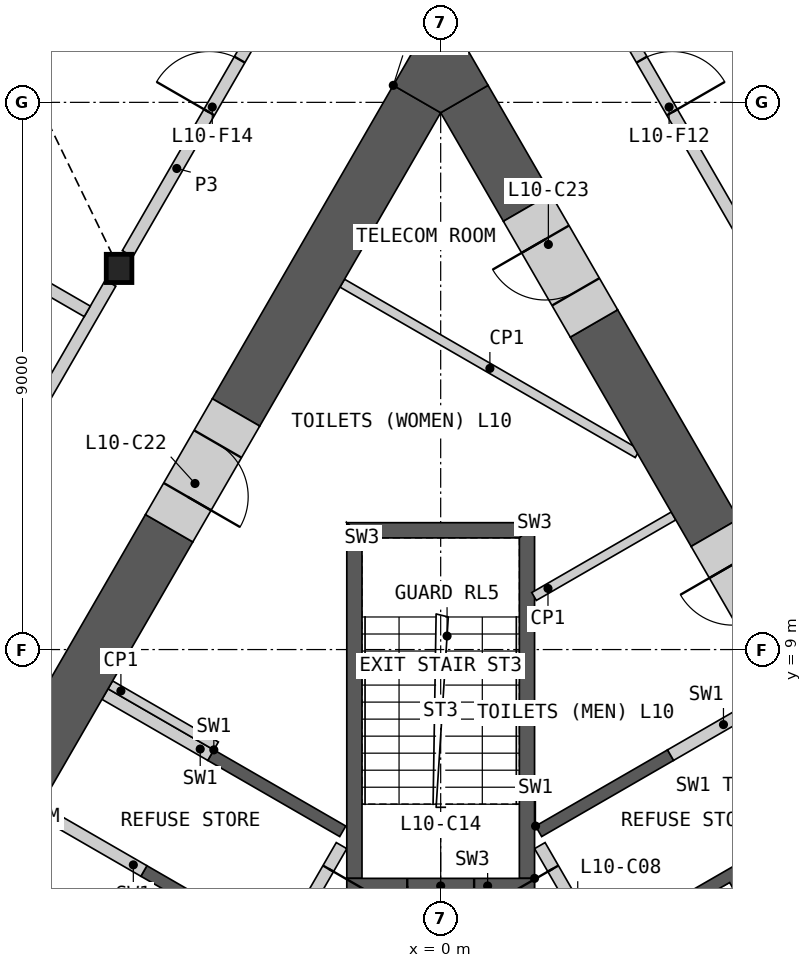
"""IFC4 building model, lengths in metres.
Left out: names, types, materials, properties, quantities, classifications, styles, units other than length and angle.
Written with IfcOpenShell. Run it as: python <this file> out.ifc"""

import sys

from ifc_helpers import new_model, si_unit, direction, frame, frame_2d, origin, origin_2d, place, context, subcontext, project, spatial, polyline, rectangle, i_section, outline, extrude, element, fill, save


model = new_model("IFC4")
c1 = context("Model", 3, precision=1e-05, world=origin(), true_north=direction((0.0, 1.0)))
c2 = subcontext(c1, "Body", "Model", "MODEL_VIEW")
j1 = project(units=[si_unit("LENGTHUNIT", "METRE"), si_unit("PLANEANGLEUNIT", "RADIAN")], contexts=[c1])
p1 = place(None, origin())
s1 = spatial("IfcSite", under=j1, at=p1, CompositionType="ELEMENT")
p2 = place(p1, origin())
s2 = spatial("IfcBuilding", under=s1, at=p2, CompositionType="ELEMENT")
p3 = place(p2, frame((0.0, 0.0, 51.0)))
s3 = spatial("IfcBuildingStorey", under=s2, at=p3, CompositionType="ELEMENT", Elevation=51.0)
p4 = place(p3, frame((-5.289, 15.269, 0.0), z_axis=(0.0, 0.0, 1.0), x_axis=(1.0, 0.0, 0.0)))
e1 = element("IfcColumn", 1, at=p4, inside=s3, PredefinedType="COLUMN", context=c2, shape_type="SweptSolid", body=[
    extrude(i_section(OverallWidth=0.421, OverallDepth=0.465, WebThickness=0.045, FlangeThickness=0.072, at=origin_2d()), origin(), (0.0, 0.0, 1.0), 4.2),
])
p5 = place(p3, origin())
e2 = element("IfcWall", 2, at=p5, inside=s3, PredefinedType="SHEAR", context=c2, shape_type="SweptSolid", body=[
    extrude(outline(polyline([(1.561, 6.097), (3.731, 7.35), (3.831, 7.177), (1.66, 5.924), (1.561, 6.097)])), origin(), (0.0, 0.0, 1.0), 3.8),
])
p6 = place(p3, origin())
e3 = element("IfcWall", 3, at=p6, inside=s3, PredefinedType="SHEAR", context=c2, shape_type="SweptSolid", body=[
    extrude(outline(polyline([(2.66, 4.192), (4.831, 5.445), (8.231, -0.444), (6.061, -1.697), (5.96, -1.524), (7.952, -0.374), (6.952, 1.358), (4.96, 0.208), (4.861, 0.381), (6.852, 1.531), (5.852, 3.263), (3.861, 2.113), (3.76, 2.287), (5.752, 3.437), (4.752, 5.169), (2.76, 4.019), (2.66, 4.192)])), origin(), (0.0, 0.0, 1.0), 3.8),
])
p7 = place(p3, frame((5.817, -1.476, 0.0), z_axis=(0.0, 0.0, 1.0), x_axis=(-0.500002616675, 0.866023893041, 0.0)))
e4 = element("IfcWall", 4, at=p7, inside=s3, PredefinedType="SOLIDWALL", context=c2, shape_type="SweptSolid", body=[
    extrude(rectangle(XDim=8.373, YDim=0.2, at=frame_2d((4.187, 0.0))), origin(), (0.0, 0.0, 1.0), 3.8),
])
p8 = place(p7, frame((0.337, 0.0, 0.0)))
e5 = element("IfcOpeningElement", 5, at=p8, cuts=e4, PredefinedType="OPENING", context=c2, shape_type="SweptSolid", body=[
    extrude(rectangle(XDim=1.1, YDim=2.1, at=frame_2d((0.55, 1.05))), frame((0.0, 0.11, 0.0), z_axis=(0.0, -1.0, 0.0), x_axis=(1.0, 0.0, 0.0)), (0.0, 0.0, 1.0), 0.22),
])
p9 = place(p7, frame((2.537, 0.0, 0.0)))
e6 = element("IfcOpeningElement", 6, at=p9, cuts=e4, PredefinedType="OPENING", context=c2, shape_type="SweptSolid", body=[
    extrude(rectangle(XDim=1.1, YDim=2.1, at=frame_2d((0.55, 1.05))), frame((0.0, 0.11, 0.0), z_axis=(0.0, -1.0, 0.0), x_axis=(1.0, 0.0, 0.0)), (0.0, 0.0, 1.0), 0.22),
])
p10 = place(p7, frame((4.737, 0.0, 0.0)))
e7 = element("IfcOpeningElement", 7, at=p10, cuts=e4, PredefinedType="OPENING", context=c2, shape_type="SweptSolid", body=[
    extrude(rectangle(XDim=1.1, YDim=2.1, at=frame_2d((0.55, 1.05))), frame((0.0, 0.11, 0.0), z_axis=(0.0, -1.0, 0.0), x_axis=(1.0, 0.0, 0.0)), (0.0, 0.0, 1.0), 0.22),
])
p11 = place(p7, frame((7.037, 0.0, 0.0)))
e8 = element("IfcOpeningElement", 8, at=p11, cuts=e4, PredefinedType="OPENING", context=c2, shape_type="SweptSolid", body=[
    extrude(rectangle(XDim=0.9, YDim=2.1, at=frame_2d((0.45, 1.05))), frame((0.0, 0.11, 0.0), z_axis=(0.0, -1.0, 0.0), x_axis=(1.0, 0.0, 0.0)), (0.0, 0.0, 1.0), 0.22),
])
p12 = place(p3, frame((3.781, 7.263, 0.0), z_axis=(0.0, 0.0, 1.0), x_axis=(0.865983199114, 0.50007309351, 0.0)))
e9 = element("IfcWall", 9, at=p12, inside=s3, PredefinedType="SHEAR", context=c2, shape_type="SweptSolid", body=[
    extrude(rectangle(XDim=2.009, YDim=0.2, at=frame_2d((1.004, 0.0))), origin(), (0.0, 0.0, 1.0), 3.8),
])
p13 = place(p3, origin())
e10 = element("IfcWall", 10, at=p13, inside=s3, PredefinedType="SHEAR", context=c2, shape_type="SweptSolid", body=[
    extrude(outline(polyline([(-2.76, 4.019), (-4.931, 5.272), (-4.831, 5.445), (-2.66, 4.192), (-2.76, 4.019)])), origin(), (0.0, 0.0, 1.0), 3.8),
])
p14 = place(p3, origin())
e11 = element("IfcWall", 11, at=p14, inside=s3, PredefinedType="SHEAR", context=c2, shape_type="SweptSolid", body=[
    extrude(outline(polyline([(-3.731, 7.35), (-1.561, 6.097), (-1.66, 5.924), (-3.831, 7.177), (-3.731, 7.35)])), origin(), (0.0, 0.0, 1.0), 3.8),
])
p15 = place(p3, frame((-1.631, 5.776, 0.0), z_axis=(0.0, 0.0, 1.0), x_axis=(-0.499992876559, -0.866029516466, 0.0)))
e12 = element("IfcWall", 12, at=p15, inside=s3, PredefinedType="SOLIDWALL", context=c2, shape_type="SweptSolid", body=[
    extrude(rectangle(XDim=6.486, YDim=0.2, at=frame_2d((3.243, 0.0))), origin(), (0.0, 0.0, 1.0), 3.8),
])
p16 = place(p15, frame((0.437, 0.0, 0.0)))
e13 = element("IfcOpeningElement", 13, at=p16, cuts=e12, PredefinedType="OPENING", context=c2, shape_type="SweptSolid", body=[
    extrude(rectangle(XDim=0.9, YDim=2.1, at=frame_2d((0.45, 1.05))), frame((0.0, 0.11, 0.0), z_axis=(0.0, -1.0, 0.0), x_axis=(1.0, 0.0, 0.0)), (0.0, 0.0, 1.0), 0.22),
])
p17 = place(p15, frame((2.637, 0.0, 0.0)))
e14 = element("IfcOpeningElement", 14, at=p17, cuts=e12, PredefinedType="OPENING", context=c2, shape_type="SweptSolid", body=[
    extrude(rectangle(XDim=0.9, YDim=2.1, at=frame_2d((0.45, 1.05))), frame((0.0, 0.11, 0.0), z_axis=(0.0, -1.0, 0.0), x_axis=(1.0, 0.0, 0.0)), (0.0, 0.0, 1.0), 0.22),
])
p18 = place(p3, frame((-3.781, 7.263, 0.0), z_axis=(0.0, 0.0, 1.0), x_axis=(-0.865983199114, 0.50007309351, 0.0)))
e15 = element("IfcWall", 15, at=p18, inside=s3, PredefinedType="SHEAR", context=c2, shape_type="SweptSolid", body=[
    extrude(rectangle(XDim=2.009, YDim=0.2, at=frame_2d((1.004, 0.0))), origin(), (0.0, 0.0, 1.0), 3.8),
])
p19 = place(p3, frame((-4.881, 5.358, 0.0), z_axis=(0.0, 0.0, 1.0), x_axis=(-0.866035824272, 0.499981950752, 0.0)))
e16 = element("IfcWall", 16, at=p19, inside=s3, PredefinedType="SHEAR", context=c2, shape_type="SweptSolid", body=[
    extrude(rectangle(XDim=2.009, YDim=0.2, at=frame_2d((1.004, 0.0))), origin(), (0.0, 0.0, 1.0), 3.8),
])
p20 = place(p3, origin())
e17 = element("IfcWall", 17, at=p20, inside=s3, PredefinedType="SHEAR", context=c2, shape_type="SweptSolid", body=[
    extrude(outline(polyline([(1.544, 5.237), (1.544, 11.087), (1.294, 10.837), (1.294, 5.237), (1.544, 5.237)])), origin(), (0.0, 0.0, 1.0), 3.8),
])
p21 = place(p3, origin())
e18 = element("IfcWall", 18, at=p21, inside=s3, PredefinedType="SHEAR", context=c2, shape_type="SweptSolid", body=[
    extrude(outline(polyline([(1.544, 11.087), (-1.544, 11.087), (-1.294, 10.837), (1.294, 10.837), (1.544, 11.087)])), origin(), (0.0, 0.0, 1.0), 3.8),
])
p22 = place(p3, origin())
e19 = element("IfcWall", 19, at=p22, inside=s3, PredefinedType="SHEAR", context=c2, shape_type="SweptSolid", body=[
    extrude(outline(polyline([(-1.294, 10.837), (-1.544, 11.087), (-1.544, 5.237), (-1.294, 5.237), (-1.294, 10.837)])), origin(), (0.0, 0.0, 1.0), 3.8),
])
p23 = place(p3, frame((1.544, 5.112, 0.0), z_axis=(0.0, 0.0, 1.0), x_axis=(-1.0, 0.0, 0.0)))
e20 = element("IfcWall", 20, at=p23, inside=s3, PredefinedType="SHEAR", context=c2, shape_type="SweptSolid", body=[
    extrude(rectangle(XDim=3.088, YDim=0.25, at=frame_2d((1.544, 0.0))), origin(), (0.0, 0.0, 1.0), 3.8),
])
p24 = place(p23, frame((0.994, 0.0, 0.0)))
e21 = element("IfcOpeningElement", 21, at=p24, cuts=e20, PredefinedType="OPENING", context=c2, shape_type="SweptSolid", body=[
    extrude(rectangle(XDim=1.1, YDim=2.1, at=frame_2d((0.55, 1.05))), frame((0.0, 0.135, 0.0), z_axis=(0.0, -1.0, 0.0), x_axis=(1.0, 0.0, 0.0)), (0.0, 0.0, 1.0), 0.27),
])
p25 = place(p3, frame((-3.693, 7.415, 0.0), z_axis=(0.0, 0.0, 1.0), x_axis=(-0.866035824272, 0.499981950752, 0.0)))
e22 = element("IfcWall", 22, at=p25, inside=s3, PredefinedType="PARTITIONING", context=c2, shape_type="SweptSolid", body=[
    extrude(rectangle(XDim=2.009, YDim=0.15, at=frame_2d((1.004, 0.0))), origin(), (0.0, 0.0, 1.0), 3.8),
])
p26 = place(p3, frame((3.829, 11.197, 0.0), z_axis=(0.0, 0.0, 1.0), x_axis=(-0.866016748302, -0.500014991436, 0.0)))
e23 = element("IfcWall", 23, at=p26, inside=s3, PredefinedType="PARTITIONING", context=c2, shape_type="SweptSolid", body=[
    extrude(rectangle(XDim=2.649, YDim=0.15, at=frame_2d((1.324, 0.0))), origin(), (0.0, 0.0, 1.0), 3.8),
])
p27 = place(p3, frame((-1.619, 15.026, 0.0), z_axis=(0.0, 0.0, 1.0), x_axis=(0.866015917575, -0.500016430238, 0.0)))
e24 = element("IfcWall", 24, at=p27, inside=s3, PredefinedType="PARTITIONING", context=c2, shape_type="SweptSolid", body=[
    extrude(rectangle(XDim=5.607, YDim=0.15, at=frame_2d((2.804, 0.0))), origin(), (0.0, 0.0, 1.0), 3.8),
])
p28 = place(p3, frame((4.509, 10.921, 0.0), z_axis=(0.0, 0.0, 1.0), x_axis=(-0.49999004381, 0.866031151917, 0.0)))
e25 = element("IfcWall", 25, at=p28, inside=s3, PredefinedType="SHEAR", context=c2, shape_type="SweptSolid", body=[
    extrude(rectangle(XDim=3.975, YDim=0.9, at=frame_2d((1.988, 0.0))), origin(), (0.0, 0.0, 1.0), 3.8),
])
p29 = place(p3, frame((1.421, 16.269, 0.0), z_axis=(0.0, 0.0, 1.0), x_axis=(-0.500009360108, 0.866019999656, 0.0)))
e26 = element("IfcWall", 26, at=p29, inside=s3, PredefinedType="SHEAR", context=c2, shape_type="SweptSolid", body=[
    extrude(rectangle(XDim=2.062, YDim=0.9, at=frame_2d((1.031, 0.0))), origin(), (0.0, 0.0, 1.0), 3.8),
])
p30 = place(p3, frame((-4.466, 10.995, 0.0), z_axis=(0.0, 0.0, 1.0), x_axis=(-0.500012427149, -0.866018228848, 0.0)))
e27 = element("IfcWall", 27, at=p30, inside=s3, PredefinedType="SHEAR", context=c2, shape_type="SweptSolid", body=[
    extrude(rectangle(XDim=7.409, YDim=0.9, at=frame_2d((3.705, 0.0))), origin(), (0.0, 0.0, 1.0), 3.8),
])
p31 = place(p3, frame((-0.39, 18.055, 0.0), z_axis=(0.0, 0.0, 1.0), x_axis=(-0.499981657175, -0.86603599376, 0.0)))
e28 = element("IfcWall", 28, at=p31, inside=s3, PredefinedType="SHEAR", context=c2, shape_type="SweptSolid", body=[
    extrude(rectangle(XDim=5.952, YDim=0.9, at=frame_2d((2.976, 0.0))), origin(), (0.0, 0.0, 1.0), 3.8),
])
p32 = place(p3, origin())
e29 = element("IfcWall", 29, at=p32, inside=s3, PredefinedType="SHEAR", context=c2, shape_type="SweptSolid", body=[
    extrude(outline(polyline([(-0.779, 18.28), (0.0, 19.63), (0.779, 18.28), (0.0, 17.83), (-0.779, 18.28)])), origin(), (0.0, 0.0, 1.0), 3.8),
])
p33 = place(p3, frame((5.608, 9.016, 0.0), z_axis=(0.0, 0.0, 1.0), x_axis=(-0.499994660107, 0.866028486751, 0.0)))
e30 = element("IfcWall", 30, at=p33, inside=s3, PredefinedType="SHEAR", context=c2, shape_type="SweptSolid", body=[
    extrude(rectangle(XDim=2.2, YDim=0.9, at=frame_2d((1.1, 0.0))), origin(), (0.0, 0.0, 1.0), 3.8),
])
p34 = place(p33, frame((0.6, 0.0, 0.0)))
e31 = element("IfcOpeningElement", 31, at=p34, cuts=e30, PredefinedType="OPENING", context=c2, shape_type="SweptSolid", body=[
    extrude(rectangle(XDim=1.0, YDim=2.1, at=frame_2d((0.5, 1.05))), frame((0.0, 0.46, 0.0), z_axis=(0.0, -1.0, 0.0), x_axis=(1.0, 0.0, 0.0)), (0.0, 0.0, 1.0), 0.92),
])
p35 = place(p3, frame((-3.365, 12.9, 0.0), z_axis=(0.0, 0.0, 1.0), x_axis=(-0.500077893725, -0.86598042715, 0.0)))
e32 = element("IfcWall", 32, at=p35, inside=s3, PredefinedType="SHEAR", context=c2, shape_type="SweptSolid", body=[
    extrude(rectangle(XDim=2.2, YDim=0.9, at=frame_2d((1.1, 0.0))), origin(), (0.0, 0.0, 1.0), 3.8),
])
p36 = place(p35, frame((0.6, 0.0, 0.0)))
e33 = element("IfcOpeningElement", 33, at=p36, cuts=e32, PredefinedType="OPENING", context=c2, shape_type="SweptSolid", body=[
    extrude(rectangle(XDim=1.0, YDim=2.1, at=frame_2d((0.5, 1.05))), frame((0.0, 0.46, 0.0), z_axis=(0.0, -1.0, 0.0), x_axis=(1.0, 0.0, 0.0)), (0.0, 0.0, 1.0), 0.92),
])
p37 = place(p3, frame((2.521, 14.364, 0.0), z_axis=(0.0, 0.0, 1.0), x_axis=(-0.50002983664, 0.866008176907, 0.0)))
e34 = element("IfcWall", 34, at=p37, inside=s3, PredefinedType="SHEAR", context=c2, shape_type="SweptSolid", body=[
    extrude(rectangle(XDim=2.2, YDim=0.9, at=frame_2d((1.1, 0.0))), origin(), (0.0, 0.0, 1.0), 3.8),
])
p38 = place(p37, frame((0.6, 0.0, 0.0)))
e35 = element("IfcOpeningElement", 35, at=p38, cuts=e34, PredefinedType="OPENING", context=c2, shape_type="SweptSolid", body=[
    extrude(rectangle(XDim=1.0, YDim=2.1, at=frame_2d((0.5, 1.05))), frame((0.0, 0.46, 0.0), z_axis=(0.0, -1.0, 0.0), x_axis=(1.0, 0.0, 0.0)), (0.0, 0.0, 1.0), 0.92),
])
p39 = place(p3, frame((-10.439, 6.35, 0.0), z_axis=(0.0, 0.0, 1.0), x_axis=(0.50001002959, 0.86601961312, 0.0)))
e36 = element("IfcWall", 36, at=p39, inside=s3, PredefinedType="PARTITIONING", context=c2, shape_type="SweptSolid", body=[
    extrude(rectangle(XDim=10.019, YDim=0.2, at=frame_2d((5.009, 0.0))), origin(), (0.0, 0.0, 1.0), 3.8),
])
p40 = place(p39, frame((4.159, 0.0, 0.0)))
e37 = element("IfcOpeningElement", 37, at=p40, cuts=e36, PredefinedType="OPENING", context=c2, shape_type="SweptSolid", body=[
    extrude(rectangle(XDim=1.0, YDim=2.1, at=frame_2d((0.5, 1.05))), frame((0.0, 0.11, 0.0), z_axis=(0.0, -1.0, 0.0), x_axis=(1.0, 0.0, 0.0)), (0.0, 0.0, 1.0), 0.22),
])
p41 = place(p3, frame((1.913, 21.116, 0.0), z_axis=(0.0, 0.0, 1.0), x_axis=(0.500001069878, -0.866024786089, 0.0)))
e38 = element("IfcWall", 38, at=p41, inside=s3, PredefinedType="PARTITIONING", context=c2, shape_type="SweptSolid", body=[
    extrude(rectangle(XDim=6.473, YDim=0.2, at=frame_2d((3.236, 0.0))), origin(), (0.0, 0.0, 1.0), 3.8),
])
p42 = place(p41, frame((2.787, 0.0, 0.0)))
e39 = element("IfcOpeningElement", 39, at=p42, cuts=e38, PredefinedType="OPENING", context=c2, shape_type="SweptSolid", body=[
    extrude(rectangle(XDim=1.0, YDim=2.1, at=frame_2d((0.5, 1.05))), frame((0.0, 0.11, 0.0), z_axis=(0.0, -1.0, 0.0), x_axis=(1.0, 0.0, 0.0)), (0.0, 0.0, 1.0), 0.22),
])
p43 = place(p3, frame((-5.149, 15.511, 0.0), z_axis=(0.0, 0.0, 1.0), x_axis=(0.500001069878, 0.866024786089, 0.0)))
e40 = element("IfcWall", 40, at=p43, inside=s3, PredefinedType="PARTITIONING", context=c2, shape_type="SweptSolid", body=[
    extrude(rectangle(XDim=6.473, YDim=0.2, at=frame_2d((3.236, 0.0))), origin(), (0.0, 0.0, 1.0), 3.8),
])
p44 = place(p43, frame((2.686, 0.0, 0.0)))
e41 = element("IfcOpeningElement", 41, at=p44, cuts=e40, PredefinedType="OPENING", context=c2, shape_type="SweptSolid", body=[
    extrude(rectangle(XDim=1.0, YDim=2.1, at=frame_2d((0.5, 1.05))), frame((0.0, 0.11, 0.0), z_axis=(0.0, -1.0, 0.0), x_axis=(1.0, 0.0, 0.0)), (0.0, 0.0, 1.0), 0.22),
])
p45 = place(p3, frame((-17.061, 21.057, 0.0), z_axis=(0.0, 0.0, 1.0), x_axis=(0.866020631549, -0.500008265664, 0.0)))
e42 = element("IfcWall", 42, at=p45, inside=s3, PredefinedType="PARTITIONING", context=c2, shape_type="SweptSolid", body=[
    extrude(rectangle(XDim=12.989, YDim=0.2, at=frame_2d((6.495, 0.0))), origin(), (0.0, 0.0, 1.0), 2.885),
])
p46 = place(p11, origin())
e43 = element("IfcDoor", 43, at=p46, inside=s3, OperationType="SINGLE_SWING_RIGHT", PredefinedType="DOOR", context=c2, shape_type="SweptSolid", body=[
    extrude(rectangle(XDim=0.9, YDim=2.1, at=frame_2d((0.45, 1.05))), frame((0.0, 0.025, 0.0), z_axis=(0.0, -1.0, 0.0), x_axis=(1.0, 0.0, 0.0)), (0.0, 0.0, 1.0), 0.05),
])
fill(e8, e43)
p47 = place(p16, origin())
e44 = element("IfcDoor", 44, at=p47, inside=s3, OperationType="SINGLE_SWING_LEFT", PredefinedType="DOOR", context=c2, shape_type="SweptSolid", body=[
    extrude(rectangle(XDim=0.9, YDim=2.1, at=frame_2d((0.45, 1.05))), frame((0.0, 0.025, 0.0), z_axis=(0.0, -1.0, 0.0), x_axis=(1.0, 0.0, 0.0)), (0.0, 0.0, 1.0), 0.05),
])
fill(e13, e44)
p48 = place(p24, origin())
e45 = element("IfcDoor", 45, at=p48, inside=s3, OperationType="SINGLE_SWING_RIGHT", PredefinedType="DOOR", context=c2, shape_type="SweptSolid", body=[
    extrude(rectangle(XDim=1.1, YDim=2.1, at=frame_2d((0.55, 1.05))), frame((0.0, 0.025, 0.0), z_axis=(0.0, -1.0, 0.0), x_axis=(1.0, 0.0, 0.0)), (0.0, 0.0, 1.0), 0.05),
])
fill(e21, e45)
p49 = place(p34, origin())
e46 = element("IfcDoor", 46, at=p49, inside=s3, OperationType="SINGLE_SWING_RIGHT", PredefinedType="DOOR", context=c2, shape_type="SweptSolid", body=[
    extrude(rectangle(XDim=1.0, YDim=2.1, at=frame_2d((0.5, 1.05))), frame((0.0, 0.205, 0.0), z_axis=(0.0, -1.0, 0.0), x_axis=(1.0, 0.0, 0.0)), (0.0, 0.0, 1.0), 0.05),
])
fill(e31, e46)
p50 = place(p36, origin())
e47 = element("IfcDoor", 47, at=p50, inside=s3, OperationType="SINGLE_SWING_RIGHT", PredefinedType="DOOR", context=c2, shape_type="SweptSolid", body=[
    extrude(rectangle(XDim=1.0, YDim=2.1, at=frame_2d((0.5, 1.05))), frame((0.0, 0.205, 0.0), z_axis=(0.0, -1.0, 0.0), x_axis=(1.0, 0.0, 0.0)), (0.0, 0.0, 1.0), 0.05),
])
fill(e33, e47)
p51 = place(p38, origin())
e48 = element("IfcDoor", 48, at=p51, inside=s3, OperationType="SINGLE_SWING_RIGHT", PredefinedType="DOOR", context=c2, shape_type="SweptSolid", body=[
    extrude(rectangle(XDim=1.0, YDim=2.1, at=frame_2d((0.5, 1.05))), frame((0.0, 0.205, 0.0), z_axis=(0.0, -1.0, 0.0), x_axis=(1.0, 0.0, 0.0)), (0.0, 0.0, 1.0), 0.05),
])
fill(e35, e48)
p52 = place(p42, origin())
e49 = element("IfcDoor", 49, at=p52, inside=s3, OperationType="SINGLE_SWING_RIGHT", PredefinedType="DOOR", context=c2, shape_type="SweptSolid", body=[
    extrude(rectangle(XDim=1.0, YDim=2.1, at=frame_2d((0.5, 1.05))), frame((0.0, 0.025, 0.0), z_axis=(0.0, -1.0, 0.0), x_axis=(1.0, 0.0, 0.0)), (0.0, 0.0, 1.0), 0.05),
])
fill(e39, e49)
p53 = place(p44, origin())
e50 = element("IfcDoor", 50, at=p53, inside=s3, OperationType="SINGLE_SWING_LEFT", PredefinedType="DOOR", context=c2, shape_type="SweptSolid", body=[
    extrude(rectangle(XDim=1.0, YDim=2.1, at=frame_2d((0.5, 1.05))), frame((0.0, 0.025, 0.0), z_axis=(0.0, -1.0, 0.0), x_axis=(1.0, 0.0, 0.0)), (0.0, 0.0, 1.0), 0.05),
])
fill(e41, e50)
save(model, sys.argv[1])
